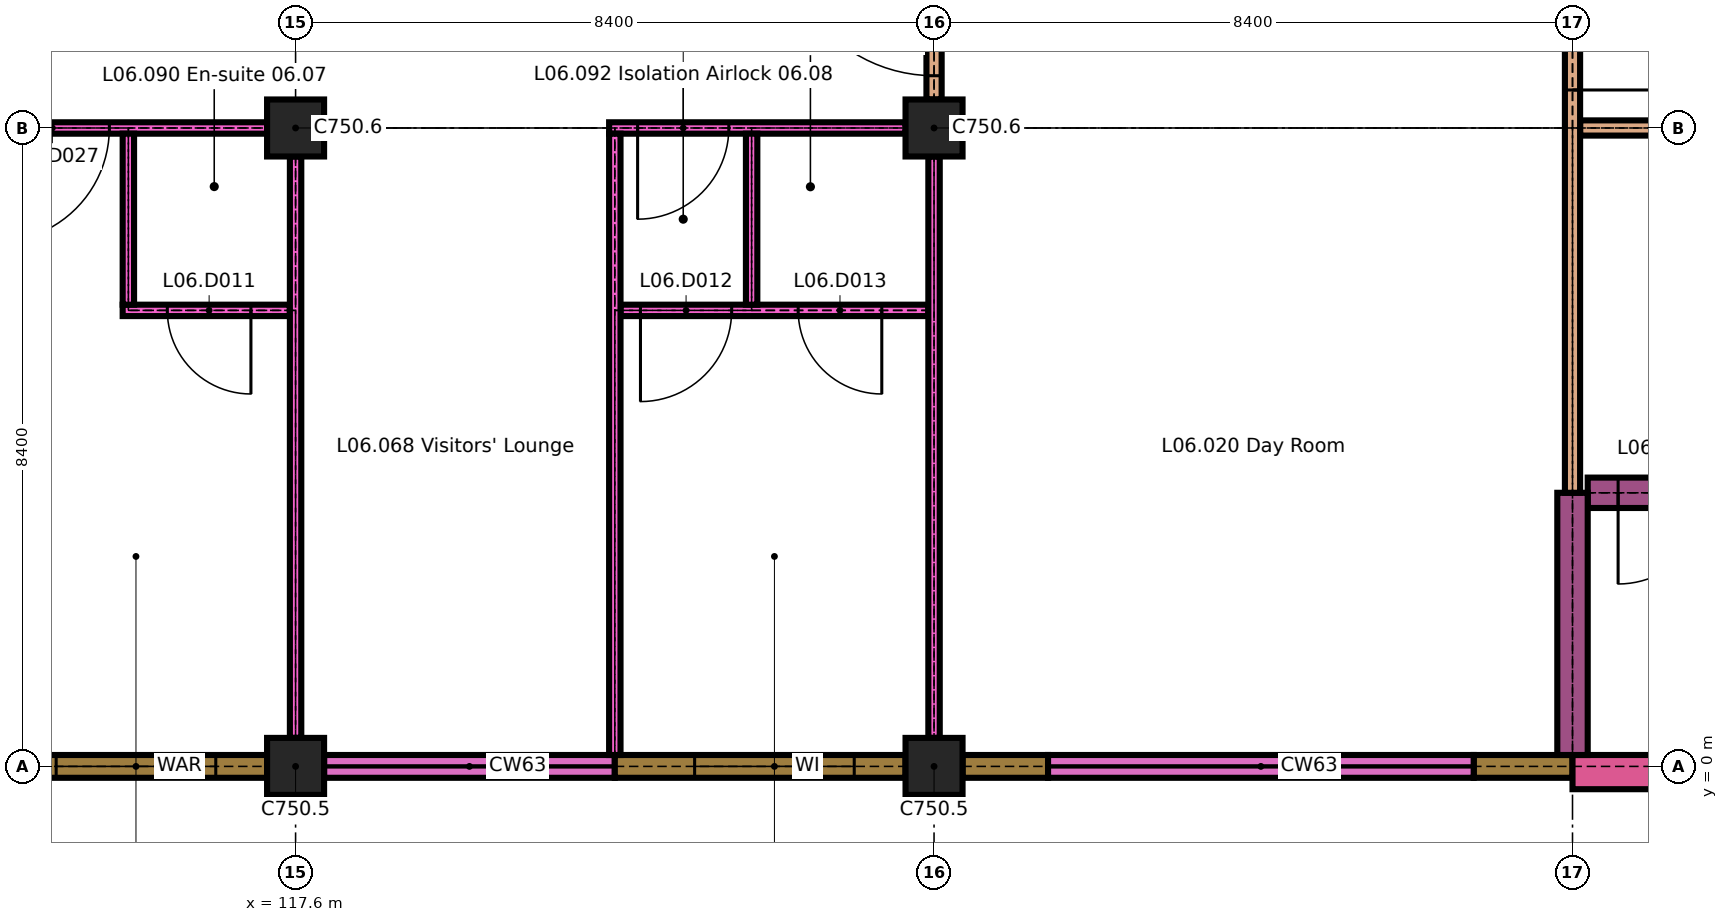
"""IFC4 building model, lengths in metres.
Left out: names, types, materials, properties, quantities, classifications, styles, units other than length and angle.
Written with IfcOpenShell. Run it as: python <this file> out.ifc"""

import sys

from ifc_helpers import new_model, si_unit, direction, frame, frame_2d, origin, origin_2d, place, context, subcontext, project, spatial, rectangle, extrude, element, fill, save


model = new_model("IFC4")
c1 = context("Model", 3, precision=1e-05, world=origin(), true_north=direction((0.0, 1.0)))
c2 = subcontext(c1, "Body", "Model", "MODEL_VIEW")
j1 = project(units=[si_unit("LENGTHUNIT", "METRE"), si_unit("PLANEANGLEUNIT", "RADIAN")], contexts=[c1])
p1 = place(None, origin())
s1 = spatial("IfcSite", under=j1, at=p1, CompositionType="ELEMENT")
p2 = place(p1, origin())
s2 = spatial("IfcBuilding", under=s1, at=p2, CompositionType="ELEMENT")
p3 = place(p2, frame((0.0, 0.0, 26.1)))
s3 = spatial("IfcBuildingStorey", under=s2, at=p3, CompositionType="ELEMENT", Elevation=26.1)
for number, where, z_axis, x_axis in (
    (1, (117.6, 0.0, 0.0), (0.0, 0.0, 1.0), (1.0, 0.0, 0.0)),
    (2, (126.0, 0.0, 0.0), (0.0, 0.0, 1.0), (1.0, 0.0, 0.0)),
):
    element("IfcColumn", number, at=place(p3, frame(where, z_axis=z_axis, x_axis=x_axis)), inside=s3, PredefinedType="COLUMN", context=c2, shape_type="SweptSolid", body=[
        extrude(rectangle(XDim=0.75, YDim=0.75, at=origin_2d()), origin(), (0.0, 0.0, 1.0), 3.2),
    ])
for number, where, z_axis, x_axis in (
    (3, (117.6, 8.4, 0.0), (0.0, 0.0, 1.0), (1.0, 0.0, 0.0)),
    (4, (126.0, 8.4, 0.0), (0.0, 0.0, 1.0), (1.0, 0.0, 0.0)),
):
    element("IfcColumn", number, at=place(p3, frame(where, z_axis=z_axis, x_axis=x_axis)), inside=s3, PredefinedType="COLUMN", context=c2, shape_type="SweptSolid", body=[
        extrude(rectangle(XDim=0.75, YDim=0.75, at=origin_2d()), origin(), (0.0, 0.0, 1.0), 3.3),
    ])
p4 = place(p3, frame((113.4, 0.0, 0.0), z_axis=(0.0, 0.0, 1.0), x_axis=(1.0, 0.0, 0.0)))
e5 = element("IfcWall", 5, at=p4, inside=s3, PredefinedType="SOLIDWALL", context=c2, shape_type="SweptSolid", body=[
    extrude(rectangle(XDim=3.825, YDim=0.3, at=frame_2d((1.913, 0.0))), origin(), (0.0, 0.0, 1.0), 2.9),
])
p5 = place(p4, frame((1.05, 0.0, 0.9)))
e6 = element("IfcOpeningElement", 6, at=p5, cuts=e5, PredefinedType="OPENING", context=c2, shape_type="SweptSolid", body=[
    extrude(rectangle(XDim=2.1, YDim=1.5, at=frame_2d((1.05, 0.75))), frame((0.0, 0.16, 0.0), z_axis=(0.0, -1.0, 0.0), x_axis=(1.0, 0.0, 0.0)), (0.0, 0.0, 1.0), 0.32),
])
p6 = place(p3, frame((117.975, 0.0, 0.0), z_axis=(0.0, 0.0, 1.0), x_axis=(1.0, 0.0, 0.0)))
e7 = element("IfcWall", 7, at=p6, inside=s3, PredefinedType="SOLIDWALL", context=c2, shape_type="SweptSolid", body=[
    extrude(rectangle(XDim=3.825, YDim=0.3, at=frame_2d((1.913, 0.0))), origin(), (0.0, 0.0, 1.0), 0.6),
])
p7 = place(p3, frame((121.8, 0.0, 0.0), z_axis=(0.0, 0.0, 1.0), x_axis=(1.0, 0.0, 0.0)))
e8 = element("IfcWall", 8, at=p7, inside=s3, PredefinedType="SOLIDWALL", context=c2, shape_type="SweptSolid", body=[
    extrude(rectangle(XDim=3.825, YDim=0.3, at=frame_2d((1.913, 0.0))), origin(), (0.0, 0.0, 1.0), 2.9),
])
p8 = place(p7, frame((1.05, 0.0, 0.9)))
e9 = element("IfcOpeningElement", 9, at=p8, cuts=e8, PredefinedType="OPENING", context=c2, shape_type="SweptSolid", body=[
    extrude(rectangle(XDim=2.1, YDim=1.5, at=frame_2d((1.05, 0.75))), frame((0.0, 0.16, 0.0), z_axis=(0.0, -1.0, 0.0), x_axis=(1.0, 0.0, 0.0)), (0.0, 0.0, 1.0), 0.32),
])
p9 = place(p3, frame((126.375, 0.0, 0.0), z_axis=(0.0, 0.0, 1.0), x_axis=(1.0, 0.0, 0.0)))
e10 = element("IfcWall", 10, at=p9, inside=s3, PredefinedType="SOLIDWALL", context=c2, shape_type="SweptSolid", body=[
    extrude(rectangle(XDim=1.125, YDim=0.3, at=frame_2d((0.562, 0.0))), origin(), (0.0, 0.0, 1.0), 2.9),
])
p10 = place(p3, frame((133.1, 0.0, 0.0), z_axis=(0.0, 0.0, 1.0), x_axis=(1.0, 0.0, 0.0)))
e11 = element("IfcWall", 11, at=p10, inside=s3, PredefinedType="SOLIDWALL", context=c2, shape_type="SweptSolid", body=[
    extrude(rectangle(XDim=1.3, YDim=0.3, at=frame_2d((0.65, 0.0))), origin(), (0.0, 0.0, 1.0), 2.9),
])
p11 = place(p3, frame((127.5, 0.0, 0.0), z_axis=(0.0, 0.0, 1.0), x_axis=(1.0, 0.0, 0.0)))
e12 = element("IfcWall", 12, at=p11, inside=s3, PredefinedType="SOLIDWALL", context=c2, shape_type="SweptSolid", body=[
    extrude(rectangle(XDim=5.6, YDim=0.3, at=frame_2d((2.8, 0.0))), origin(), (0.0, 0.0, 1.0), 0.6),
])
p12 = place(p3, frame((134.4, -0.075, 0.0), z_axis=(0.0, 0.0, 1.0), x_axis=(1.0, 0.0, 0.0)))
e13 = element("IfcWall", 13, at=p12, inside=s3, PredefinedType="SOLIDWALL", context=c2, shape_type="SweptSolid", body=[
    extrude(rectangle(XDim=3.15, YDim=0.45, at=frame_2d((1.575, 0.0))), origin(), (0.0, 0.0, 1.0), 3.3),
])
p13 = place(p3, frame((134.6, 3.6, 0.0), z_axis=(0.0, 0.0, 1.0), x_axis=(1.0, 0.0, 0.0)))
e14 = element("IfcWall", 14, at=p13, inside=s3, PredefinedType="SHEAR", context=c2, shape_type="SweptSolid", body=[
    extrude(rectangle(XDim=8.0, YDim=0.4, at=frame_2d((4.0, 0.0))), origin(), (0.0, 0.0, 1.0), 3.3),
])
p14 = place(p13, frame((0.4, 0.0, 0.0)))
e15 = element("IfcOpeningElement", 15, at=p14, cuts=e14, PredefinedType="OPENING", context=c2, shape_type="SweptSolid", body=[
    extrude(rectangle(XDim=1.2, YDim=2.1, at=frame_2d((0.6, 1.05))), frame((0.0, 0.21, 0.0), z_axis=(0.0, -1.0, 0.0), x_axis=(1.0, 0.0, 0.0)), (0.0, 0.0, 1.0), 0.42),
])
p15 = place(p3, frame((115.325, 6.0, 0.0), z_axis=(0.0, 0.0, 1.0), x_axis=(1.0, 0.0, 0.0)))
e16 = element("IfcWall", 16, at=p15, inside=s3, PredefinedType="PARTITIONING", context=c2, shape_type="SweptSolid", body=[
    extrude(rectangle(XDim=2.2, YDim=0.15, at=frame_2d((1.1, 0.0))), origin(), (0.0, 0.0, 1.0), 3.3),
])
p16 = place(p15, frame((0.587, 0.0, 0.0)))
e17 = element("IfcOpeningElement", 17, at=p16, cuts=e16, PredefinedType="OPENING", context=c2, shape_type="SweptSolid", body=[
    extrude(rectangle(XDim=1.1, YDim=2.1, at=frame_2d((0.55, 1.05))), frame((0.0, 0.085, 0.0), z_axis=(0.0, -1.0, 0.0), x_axis=(1.0, 0.0, 0.0)), (0.0, 0.0, 1.0), 0.17),
])
p17 = place(p3, frame((121.875, 6.0, 0.0), z_axis=(0.0, 0.0, 1.0), x_axis=(1.0, 0.0, 0.0)))
e18 = element("IfcWall", 18, at=p17, inside=s3, PredefinedType="PARTITIONING", context=c2, shape_type="SweptSolid", body=[
    extrude(rectangle(XDim=4.05, YDim=0.15, at=frame_2d((2.025, 0.0))), origin(), (0.0, 0.0, 1.0), 3.3),
])
p18 = place(p17, frame((0.262, 0.0, 0.0)))
e19 = element("IfcOpeningElement", 19, at=p18, cuts=e18, PredefinedType="OPENING", context=c2, shape_type="SweptSolid", body=[
    extrude(rectangle(XDim=1.2, YDim=2.1, at=frame_2d((0.6, 1.05))), frame((0.0, 0.085, 0.0), z_axis=(0.0, -1.0, 0.0), x_axis=(1.0, 0.0, 0.0)), (0.0, 0.0, 1.0), 0.17),
])
p19 = place(p17, frame((2.337, 0.0, 0.0)))
e20 = element("IfcOpeningElement", 20, at=p19, cuts=e18, PredefinedType="OPENING", context=c2, shape_type="SweptSolid", body=[
    extrude(rectangle(XDim=1.1, YDim=2.1, at=frame_2d((0.55, 1.05))), frame((0.0, 0.085, 0.0), z_axis=(0.0, -1.0, 0.0), x_axis=(1.0, 0.0, 0.0)), (0.0, 0.0, 1.0), 0.17),
])
p20 = place(p3, frame((109.2, 8.4, 0.0), z_axis=(0.0, 0.0, 1.0), x_axis=(1.0, 0.0, 0.0)))
e21 = element("IfcWall", 21, at=p20, inside=s3, PredefinedType="PARTITIONING", context=c2, shape_type="SweptSolid", body=[
    extrude(rectangle(XDim=8.025, YDim=0.15, at=frame_2d((4.013, 0.0))), origin(), (0.0, 0.0, 1.0), 3.3),
])
p21 = place(p20, frame((2.7, 0.0, 0.0)))
e22 = element("IfcOpeningElement", 22, at=p21, cuts=e21, PredefinedType="OPENING", context=c2, shape_type="SweptSolid", body=[
    extrude(rectangle(XDim=1.2, YDim=2.1, at=frame_2d((0.6, 1.05))), frame((0.0, 0.085, 0.0), z_axis=(0.0, -1.0, 0.0), x_axis=(1.0, 0.0, 0.0)), (0.0, 0.0, 1.0), 0.17),
])
p22 = place(p20, frame((4.45, 0.0, 0.0)))
e23 = element("IfcOpeningElement", 23, at=p22, cuts=e21, PredefinedType="OPENING", context=c2, shape_type="SweptSolid", body=[
    extrude(rectangle(XDim=1.5, YDim=2.4, at=frame_2d((0.75, 1.2))), frame((0.0, 0.085, 0.0), z_axis=(0.0, -1.0, 0.0), x_axis=(1.0, 0.0, 0.0)), (0.0, 0.0, 1.0), 0.17),
])
p23 = place(p3, frame((121.725, 8.4, 0.0), z_axis=(0.0, 0.0, 1.0), x_axis=(1.0, 0.0, 0.0)))
e24 = element("IfcWall", 24, at=p23, inside=s3, PredefinedType="PARTITIONING", context=c2, shape_type="SweptSolid", body=[
    extrude(rectangle(XDim=3.9, YDim=0.15, at=frame_2d((1.95, 0.0))), origin(), (0.0, 0.0, 1.0), 3.3),
])
p24 = place(p23, frame((0.375, 0.0, 0.0)))
e25 = element("IfcOpeningElement", 25, at=p24, cuts=e24, PredefinedType="OPENING", context=c2, shape_type="SweptSolid", body=[
    extrude(rectangle(XDim=1.2, YDim=2.1, at=frame_2d((0.6, 1.05))), frame((0.0, 0.085, 0.0), z_axis=(0.0, -1.0, 0.0), x_axis=(1.0, 0.0, 0.0)), (0.0, 0.0, 1.0), 0.17),
])
p25 = place(p3, frame((134.5, 8.4, 0.0), z_axis=(0.0, 0.0, 1.0), x_axis=(1.0, 0.0, 0.0)))
e26 = element("IfcWall", 26, at=p25, inside=s3, PredefinedType="PARTITIONING", context=c2, shape_type="SweptSolid", body=[
    extrude(rectangle(XDim=8.3, YDim=0.2, at=frame_2d((4.15, 0.0))), origin(), (0.0, 0.0, 1.0), 3.3),
])
p26 = place(p25, frame((3.15, 0.0, 0.0)))
e27 = element("IfcOpeningElement", 27, at=p26, cuts=e26, PredefinedType="OPENING", context=c2, shape_type="SweptSolid", body=[
    extrude(rectangle(XDim=2.0, YDim=2.4, at=frame_2d((1.0, 1.2))), frame((0.0, 0.11, 0.0), z_axis=(0.0, -1.0, 0.0), x_axis=(1.0, 0.0, 0.0)), (0.0, 0.0, 1.0), 0.22),
])
p27 = place(p3, frame((115.4, 6.075, 0.0), z_axis=(0.0, 0.0, 1.0), x_axis=(0.0, 1.0, 0.0)))
e28 = element("IfcWall", 28, at=p27, inside=s3, PredefinedType="PARTITIONING", context=c2, shape_type="SweptSolid", body=[
    extrude(rectangle(XDim=2.25, YDim=0.15, at=frame_2d((1.125, 0.0))), origin(), (0.0, 0.0, 1.0), 3.3),
])
p28 = place(p3, frame((117.6, 0.375, 0.0), z_axis=(0.0, 0.0, 1.0), x_axis=(0.0, 1.0, 0.0)))
e29 = element("IfcWall", 29, at=p28, inside=s3, PredefinedType="PARTITIONING", context=c2, shape_type="SweptSolid", body=[
    extrude(rectangle(XDim=7.65, YDim=0.15, at=frame_2d((3.825, 0.0))), origin(), (0.0, 0.0, 1.0), 3.3),
])
p29 = place(p3, frame((121.8, 0.15, 0.0), z_axis=(0.0, 0.0, 1.0), x_axis=(0.0, 1.0, 0.0)))
e30 = element("IfcWall", 30, at=p29, inside=s3, PredefinedType="PARTITIONING", context=c2, shape_type="SweptSolid", body=[
    extrude(rectangle(XDim=8.175, YDim=0.15, at=frame_2d((4.087, 0.0))), origin(), (0.0, 0.0, 1.0), 3.3),
])
p30 = place(p3, frame((123.6, 6.075, 0.0), z_axis=(0.0, 0.0, 1.0), x_axis=(0.0, 1.0, 0.0)))
e31 = element("IfcWall", 31, at=p30, inside=s3, PredefinedType="PARTITIONING", context=c2, shape_type="SweptSolid", body=[
    extrude(rectangle(XDim=2.25, YDim=0.15, at=frame_2d((1.125, 0.0))), origin(), (0.0, 0.0, 1.0), 3.3),
])
p31 = place(p3, frame((126.0, 0.375, 0.0), z_axis=(0.0, 0.0, 1.0), x_axis=(0.0, 1.0, 0.0)))
e32 = element("IfcWall", 32, at=p31, inside=s3, PredefinedType="PARTITIONING", context=c2, shape_type="SweptSolid", body=[
    extrude(rectangle(XDim=7.65, YDim=0.15, at=frame_2d((3.825, 0.0))), origin(), (0.0, 0.0, 1.0), 3.3),
])
p32 = place(p3, frame((126.0, 8.775, 0.0), z_axis=(0.0, 0.0, 1.0), x_axis=(0.0, 1.0, 0.0)))
e33 = element("IfcWall", 33, at=p32, inside=s3, PredefinedType="PARTITIONING", context=c2, shape_type="SweptSolid", body=[
    extrude(rectangle(XDim=7.925, YDim=0.2, at=frame_2d((3.962, 0.0))), origin(), (0.0, 0.0, 1.0), 3.3),
])
p33 = place(p32, frame((0.312, 0.0, 0.0)))
e34 = element("IfcOpeningElement", 34, at=p33, cuts=e33, PredefinedType="OPENING", context=c2, shape_type="SweptSolid", body=[
    extrude(rectangle(XDim=2.0, YDim=2.4, at=frame_2d((1.0, 1.2))), frame((0.0, 0.11, 0.0), z_axis=(0.0, -1.0, 0.0), x_axis=(1.0, 0.0, 0.0)), (0.0, 0.0, 1.0), 0.22),
])
p34 = place(p32, frame((5.475, 0.0, 0.0)))
e35 = element("IfcOpeningElement", 35, at=p34, cuts=e33, PredefinedType="OPENING", context=c2, shape_type="SweptSolid", body=[
    extrude(rectangle(XDim=2.0, YDim=2.4, at=frame_2d((1.0, 1.2))), frame((0.0, 0.11, 0.0), z_axis=(0.0, -1.0, 0.0), x_axis=(1.0, 0.0, 0.0)), (0.0, 0.0, 1.0), 0.22),
])
p35 = place(p3, frame((134.4, 0.15, 0.0), z_axis=(0.0, 0.0, 1.0), x_axis=(0.0, 1.0, 0.0)))
e36 = element("IfcWall", 36, at=p35, inside=s3, PredefinedType="SHEAR", context=c2, shape_type="SweptSolid", body=[
    extrude(rectangle(XDim=3.45, YDim=0.4, at=frame_2d((1.725, 0.0))), origin(), (0.0, 0.0, 1.0), 3.3),
])
p36 = place(p3, frame((134.4, 3.6, 0.0), z_axis=(0.0, 0.0, 1.0), x_axis=(0.0, 1.0, 0.0)))
e37 = element("IfcWall", 37, at=p36, inside=s3, PredefinedType="PARTITIONING", context=c2, shape_type="SweptSolid", body=[
    extrude(rectangle(XDim=13.1, YDim=0.2, at=frame_2d((6.55, 0.0))), origin(), (0.0, 0.0, 1.0), 3.3),
])
p37 = place(p36, frame((5.3, 0.0, 0.0)))
e38 = element("IfcOpeningElement", 38, at=p37, cuts=e37, PredefinedType="OPENING", context=c2, shape_type="SweptSolid", body=[
    extrude(rectangle(XDim=2.0, YDim=2.4, at=frame_2d((1.0, 1.2))), frame((0.0, 0.11, 0.0), z_axis=(0.0, -1.0, 0.0), x_axis=(1.0, 0.0, 0.0)), (0.0, 0.0, 1.0), 0.22),
])
p38 = place(p36, frame((10.65, 0.0, 0.0)))
e39 = element("IfcOpeningElement", 39, at=p38, cuts=e37, PredefinedType="OPENING", context=c2, shape_type="SweptSolid", body=[
    extrude(rectangle(XDim=2.0, YDim=2.4, at=frame_2d((1.0, 1.2))), frame((0.0, 0.11, 0.0), z_axis=(0.0, -1.0, 0.0), x_axis=(1.0, 0.0, 0.0)), (0.0, 0.0, 1.0), 0.22),
])
p39 = place(p5, origin())
e40 = element("IfcWindow", 40, at=p39, inside=s3, PartitioningType="DOUBLE_PANEL_VERTICAL", PredefinedType="WINDOW", context=c2, shape_type="SweptSolid", body=[
    extrude(rectangle(XDim=2.1, YDim=1.5, at=frame_2d((1.05, 0.75))), frame((0.0, 0.05, 0.0), z_axis=(0.0, -1.0, 0.0), x_axis=(1.0, 0.0, 0.0)), (0.0, 0.0, 1.0), 0.1),
])
fill(e6, e40)
p40 = place(p8, origin())
e41 = element("IfcWindow", 41, at=p40, inside=s3, PartitioningType="SINGLE_PANEL", PredefinedType="WINDOW", context=c2, shape_type="SweptSolid", body=[
    extrude(rectangle(XDim=2.1, YDim=1.5, at=frame_2d((1.05, 0.75))), frame((0.0, 0.045, 0.0), z_axis=(0.0, -1.0, 0.0), x_axis=(1.0, 0.0, 0.0)), (0.0, 0.0, 1.0), 0.09),
])
fill(e9, e41)
p41 = place(p14, origin())
e42 = element("IfcDoor", 42, at=p41, inside=s3, OperationType="SINGLE_SWING_LEFT", PredefinedType="DOOR", context=c2, shape_type="SweptSolid", body=[
    extrude(rectangle(XDim=1.2, YDim=2.1, at=frame_2d((0.6, 1.05))), frame((0.0, 0.025, 0.0), z_axis=(0.0, -1.0, 0.0), x_axis=(1.0, 0.0, 0.0)), (0.0, 0.0, 1.0), 0.05),
])
fill(e15, e42)
p42 = place(p16, origin())
e43 = element("IfcDoor", 43, at=p42, inside=s3, OperationType="SINGLE_SWING_RIGHT", PredefinedType="DOOR", context=c2, shape_type="SweptSolid", body=[
    extrude(rectangle(XDim=1.1, YDim=2.1, at=frame_2d((0.55, 1.05))), frame((0.0, 0.025, 0.0), z_axis=(0.0, -1.0, 0.0), x_axis=(1.0, 0.0, 0.0)), (0.0, 0.0, 1.0), 0.05),
])
fill(e17, e43)
p43 = place(p18, origin())
e44 = element("IfcDoor", 44, at=p43, inside=s3, OperationType="SINGLE_SWING_LEFT", PredefinedType="DOOR", context=c2, shape_type="SweptSolid", body=[
    extrude(rectangle(XDim=1.2, YDim=2.1, at=frame_2d((0.6, 1.05))), frame((0.0, 0.05, 0.0), z_axis=(0.0, -1.0, 0.0), x_axis=(1.0, 0.0, 0.0)), (0.0, 0.0, 1.0), 0.1),
])
fill(e19, e44)
p44 = place(p19, origin())
e45 = element("IfcDoor", 45, at=p44, inside=s3, OperationType="SINGLE_SWING_RIGHT", PredefinedType="DOOR", context=c2, shape_type="SweptSolid", body=[
    extrude(rectangle(XDim=1.1, YDim=2.1, at=frame_2d((0.55, 1.05))), frame((0.0, 0.025, 0.0), z_axis=(0.0, -1.0, 0.0), x_axis=(1.0, 0.0, 0.0)), (0.0, 0.0, 1.0), 0.05),
])
fill(e20, e45)
p45 = place(p22, origin())
e46 = element("IfcDoor", 46, at=p45, inside=s3, OperationType="SINGLE_SWING_LEFT", PredefinedType="DOOR", context=c2, shape_type="SweptSolid", body=[
    extrude(rectangle(XDim=1.5, YDim=2.4, at=frame_2d((0.75, 1.2))), frame((0.0, 0.03, 0.0), z_axis=(0.0, -1.0, 0.0), x_axis=(1.0, 0.0, 0.0)), (0.0, 0.0, 1.0), 0.06),
])
fill(e23, e46)
p46 = place(p24, origin())
e47 = element("IfcDoor", 47, at=p46, inside=s3, OperationType="SINGLE_SWING_LEFT", PredefinedType="DOOR", context=c2, shape_type="SweptSolid", body=[
    extrude(rectangle(XDim=1.2, YDim=2.1, at=frame_2d((0.6, 1.05))), frame((0.0, 0.05, 0.0), z_axis=(0.0, -1.0, 0.0), x_axis=(1.0, 0.0, 0.0)), (0.0, 0.0, 1.0), 0.1),
])
fill(e25, e47)
p47 = place(p33, origin())
e48 = element("IfcDoor", 48, at=p47, inside=s3, OperationType="SINGLE_SWING_LEFT", PredefinedType="DOOR", context=c2, shape_type="SweptSolid", body=[
    extrude(rectangle(XDim=2.0, YDim=2.4, at=frame_2d((1.0, 1.2))), frame((0.0, 0.03, 0.0), z_axis=(0.0, -1.0, 0.0), x_axis=(1.0, 0.0, 0.0)), (0.0, 0.0, 1.0), 0.06),
])
fill(e34, e48)
p48 = place(p37, origin())
e49 = element("IfcDoor", 49, at=p48, inside=s3, OperationType="SINGLE_SWING_LEFT", PredefinedType="DOOR", context=c2, shape_type="SweptSolid", body=[
    extrude(rectangle(XDim=2.0, YDim=2.4, at=frame_2d((1.0, 1.2))), frame((0.0, 0.03, 0.0), z_axis=(0.0, -1.0, 0.0), x_axis=(1.0, 0.0, 0.0)), (0.0, 0.0, 1.0), 0.06),
])
fill(e38, e49)
save(model, sys.argv[1])
